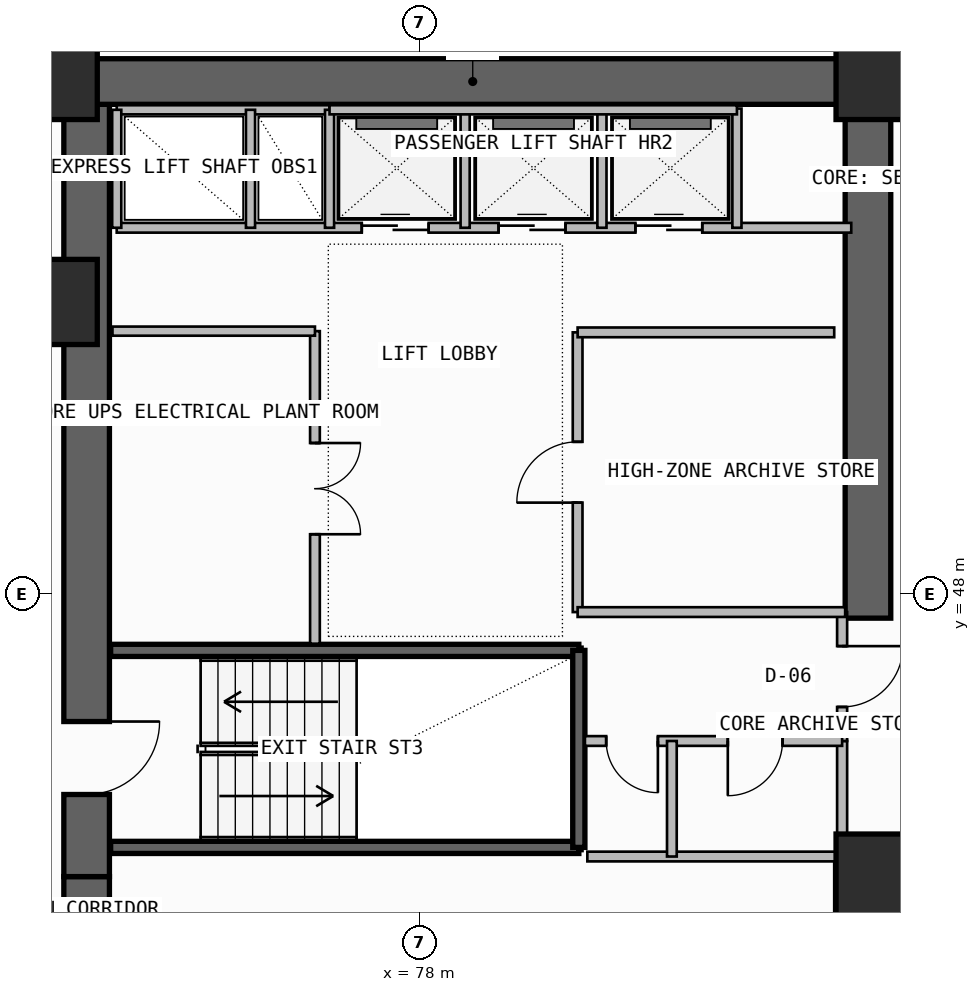
"""IFC4 building model, lengths in metres.
Left out: names, types, materials, properties, quantities, classifications, styles, units other than length and angle.
Written with IfcOpenShell. Run it as: python <this file> out.ifc"""

import sys

from ifc_helpers import new_model, si_unit, direction, frame, frame_2d, origin, origin_2d, place, context, subcontext, project, spatial, rectangle, extrude, element, fill, save


model = new_model("IFC4")
c1 = context("Model", 3, precision=1e-05, world=origin(), true_north=direction((0.0, 1.0)))
c2 = subcontext(c1, "Body", "Model", "MODEL_VIEW")
j1 = project(units=[si_unit("LENGTHUNIT", "METRE"), si_unit("PLANEANGLEUNIT", "RADIAN")], contexts=[c1])
p1 = place(None, origin())
s1 = spatial("IfcSite", under=j1, at=p1, CompositionType="ELEMENT")
p2 = place(p1, origin())
s2 = spatial("IfcBuilding", under=s1, at=p2, CompositionType="ELEMENT")
p3 = place(p2, frame((0.0, 0.0, 225.54)))
s3 = spatial("IfcBuildingStorey", under=s2, at=p3, CompositionType="ELEMENT", Elevation=225.54)
p4 = place(p3, frame((72.525, 35.5, -0.26), z_axis=(0.0, 0.0, 1.0), x_axis=(0.0, 1.0, 0.0)))
e1 = element("IfcWall", 1, at=p4, inside=s3, PredefinedType="SHEAR", context=c2, shape_type="SweptSolid", body=[
    extrude(rectangle(XDim=7.85, YDim=0.75, at=frame_2d((3.925, 0.0))), origin(), (0.0, 0.0, 1.0), 3.52),
])
p5 = place(p4, frame((1.45, 0.0, 0.26)))
e2 = element("IfcOpeningElement", 2, at=p5, cuts=e1, PredefinedType="OPENING", context=c2, shape_type="SweptSolid", body=[
    extrude(rectangle(XDim=1.2, YDim=2.2, at=frame_2d((0.6, 1.1))), frame((0.0, 0.385, 0.0), z_axis=(0.0, -1.0, 0.0), x_axis=(1.0, 0.0, 0.0)), (0.0, 0.0, 1.0), 0.77),
])
p6 = place(p3, frame((72.525, 43.35, -0.26), z_axis=(0.0, 0.0, 1.0), x_axis=(0.0, 1.0, 0.0)))
e3 = element("IfcWall", 3, at=p6, inside=s3, PredefinedType="SHEAR", context=c2, shape_type="SweptSolid", body=[
    extrude(rectangle(XDim=12.7, YDim=0.75, at=frame_2d((6.35, 0.0))), origin(), (0.0, 0.0, 1.0), 3.52),
])
p7 = place(p6, frame((1.35, 0.0, 0.26)))
e4 = element("IfcOpeningElement", 4, at=p7, cuts=e3, PredefinedType="OPENING", context=c2, shape_type="SweptSolid", body=[
    extrude(rectangle(XDim=1.2, YDim=2.2, at=frame_2d((0.6, 1.1))), frame((0.0, 0.385, 0.0), z_axis=(0.0, -1.0, 0.0), x_axis=(1.0, 0.0, 0.0)), (0.0, 0.0, 1.0), 0.77),
])
p8 = place(p3, frame((72.0, 56.425, -0.26), z_axis=(0.0, 0.0, 1.0), x_axis=(1.0, 0.0, 0.0)))
e5 = element("IfcWall", 5, at=p8, inside=s3, PredefinedType="SHEAR", context=c2, shape_type="SweptSolid", body=[
    extrude(rectangle(XDim=13.75, YDim=0.75, at=frame_2d((6.875, 0.0))), origin(), (0.0, 0.0, 1.0), 3.52),
])
p9 = place(p3, frame((85.375, 47.6, -0.26), z_axis=(0.0, 0.0, 1.0), x_axis=(0.0, 1.0, 0.0)))
e6 = element("IfcWall", 6, at=p9, inside=s3, PredefinedType="SHEAR", context=c2, shape_type="SweptSolid", body=[
    extrude(rectangle(XDim=8.45, YDim=0.75, at=frame_2d((4.225, 0.0))), origin(), (0.0, 0.0, 1.0), 3.52),
])
for number, where, z_axis, x_axis in (
    (7, (85.55, 43.35, 0.0), (0.0, 0.0, 1.0), (1.0, 0.0, 0.0)),
    (8, (72.0, 52.8, 0.0), (0.0, 0.0, 1.0), (1.0, 0.0, 0.0)),
    (9, (72.0, 56.5, 0.0), (0.0, 0.0, 1.0), (1.0, 0.0, 0.0)),
    (10, (85.55, 56.5, 0.0), (0.0, 0.0, 1.0), (1.0, 0.0, 0.0)),
):
    element("IfcColumn", number, at=place(p3, frame(where, z_axis=z_axis, x_axis=x_axis)), inside=s3, PredefinedType="COLUMN", context=c2, shape_type="SweptSolid", body=[
        extrude(rectangle(XDim=1.4, YDim=1.4, at=origin_2d()), origin(), (0.0, 0.0, 1.0), 3.52),
    ])
p10 = place(p3, frame((116.396, 56.722, 0.0), z_axis=(0.0, 0.0, 1.0), x_axis=(-0.977936620644, 0.208901809478, 0.0)))
e11 = element("IfcWall", 11, at=p10, inside=s3, PredefinedType="PARAPET", context=c2, shape_type="SweptSolid", body=[
    extrude(rectangle(XDim=31.685, YDim=0.2, at=frame_2d((15.843, 0.0))), origin(), (0.0, 0.0, 1.0), 1.15),
])
p11 = place(p3, frame((84.92, 38.85, 0.0), z_axis=(0.0, 0.0, 1.0), x_axis=(0.0, 1.0, 0.0)))
e12 = element("IfcWall", 12, at=p11, inside=s3, PredefinedType="SOLIDWALL", context=c2, shape_type="SweptSolid", body=[
    extrude(rectangle(XDim=4.83, YDim=0.2, at=frame_2d((2.415, 0.0))), origin(), (0.0, 0.0, 1.0), 3.26),
])
p12 = place(p11, frame((1.25, 0.0, 0.0)))
e13 = element("IfcOpeningElement", 13, at=p12, cuts=e12, PredefinedType="OPENING", context=c2, shape_type="SweptSolid", body=[
    extrude(rectangle(XDim=1.1, YDim=2.2, at=frame_2d((0.55, 1.1))), frame((0.0, 0.11, 0.0), z_axis=(0.0, -1.0, 0.0), x_axis=(1.0, 0.0, 0.0)), (0.0, 0.0, 1.0), 0.22),
])
for number, where, z_axis, x_axis in (
    (14, (72.92, 43.83, -0.26), (0.0, 0.0, 1.0), (1.0, 0.0, 0.0)),
    (15, (72.92, 47.07, -0.26), (0.0, 0.0, 1.0), (1.0, 0.0, 0.0)),
):
    element("IfcWall", number, at=place(p3, frame(where, z_axis=z_axis, x_axis=x_axis)), inside=s3, PredefinedType="SOLIDWALL", context=c2, shape_type="SweptSolid", body=[
        extrude(rectangle(XDim=7.7, YDim=0.2, at=frame_2d((3.85, 0.0))), origin(), (0.0, 0.0, 1.0), 3.52),
    ])
p13 = place(p3, frame((80.62, 43.83, -0.26), z_axis=(0.0, 0.0, 1.0), x_axis=(0.0, 1.0, 0.0)))
e16 = element("IfcWall", 16, at=p13, inside=s3, PredefinedType="SOLIDWALL", context=c2, shape_type="SweptSolid", body=[
    extrude(rectangle(XDim=3.24, YDim=0.2, at=frame_2d((1.62, 0.0))), origin(), (0.0, 0.0, 1.0), 3.52),
])
p14 = place(p3, frame((84.95, 43.68, 0.0), z_axis=(0.0, 0.0, 1.0), x_axis=(0.0, 1.0, 0.0)))
e17 = element("IfcWall", 17, at=p14, inside=s3, PredefinedType="PLUMBINGWALL", context=c2, shape_type="SweptSolid", body=[
    extrude(rectangle(XDim=1.9, YDim=0.165, at=frame_2d((0.95, 0.0))), origin(), (0.0, 0.0, 1.0), 3.26),
])
p15 = place(p3, frame((84.95, 45.58, 0.0), z_axis=(0.0, 0.0, 1.0), x_axis=(0.0, 1.0, 0.0)))
e18 = element("IfcWall", 18, at=p15, inside=s3, PredefinedType="PARTITIONING", context=c2, shape_type="SweptSolid", body=[
    extrude(rectangle(XDim=2.12, YDim=0.165, at=frame_2d((1.06, 0.0))), origin(), (0.0, 0.0, 1.0), 3.26),
])
p16 = place(p15, frame((0.56, 0.0, 0.0)))
e19 = element("IfcOpeningElement", 19, at=p16, cuts=e18, PredefinedType="OPENING", context=c2, shape_type="SweptSolid", body=[
    extrude(rectangle(XDim=1.0, YDim=2.2, at=frame_2d((0.5, 1.1))), frame((0.0, 0.093, 0.0), z_axis=(0.0, -1.0, 0.0), x_axis=(1.0, 0.0, 0.0)), (0.0, 0.0, 1.0), 0.185),
])
p17 = place(p3, frame((80.72, 45.58, 0.0), z_axis=(0.0, 0.0, 1.0), x_axis=(1.0, 0.0, 0.0)))
e20 = element("IfcWall", 20, at=p17, inside=s3, PredefinedType="PLUMBINGWALL", context=c2, shape_type="SweptSolid", body=[
    extrude(rectangle(XDim=4.23, YDim=0.16, at=frame_2d((2.115, 0.0))), origin(), (0.0, 0.0, 1.0), 3.26),
])
p18 = place(p17, frame((0.35, 0.0, 0.0)))
e21 = element("IfcOpeningElement", 21, at=p18, cuts=e20, PredefinedType="OPENING", context=c2, shape_type="SweptSolid", body=[
    extrude(rectangle(XDim=0.85, YDim=2.05, at=frame_2d((0.425, 1.025))), frame((0.0, 0.09, 0.0), z_axis=(0.0, -1.0, 0.0), x_axis=(1.0, 0.0, 0.0)), (0.0, 0.0, 1.0), 0.18),
])
p19 = place(p17, frame((2.35, 0.0, 0.0)))
e22 = element("IfcOpeningElement", 22, at=p19, cuts=e20, PredefinedType="OPENING", context=c2, shape_type="SweptSolid", body=[
    extrude(rectangle(XDim=0.9, YDim=2.1, at=frame_2d((0.45, 1.05))), frame((0.0, 0.09, 0.0), z_axis=(0.0, -1.0, 0.0), x_axis=(1.0, 0.0, 0.0)), (0.0, 0.0, 1.0), 0.18),
])
p20 = place(p3, frame((80.76, 43.68, 0.0), z_axis=(0.0, 0.0, 1.0), x_axis=(1.0, 0.0, 0.0)))
e23 = element("IfcWall", 23, at=p20, inside=s3, PredefinedType="PLUMBINGWALL", context=c2, shape_type="SweptSolid", body=[
    extrude(rectangle(XDim=4.19, YDim=0.16, at=frame_2d((2.095, 0.0))), origin(), (0.0, 0.0, 1.0), 3.26),
])
p21 = place(p3, frame((82.15, 43.68, 0.0), z_axis=(0.0, 0.0, 1.0), x_axis=(0.0, 1.0, 0.0)))
e24 = element("IfcWall", 24, at=p21, inside=s3, PredefinedType="PLUMBINGWALL", context=c2, shape_type="SweptSolid", body=[
    extrude(rectangle(XDim=1.9, YDim=0.16, at=frame_2d((0.95, 0.0))), origin(), (0.0, 0.0, 1.0), 3.26),
])
p22 = place(p3, frame((76.28, 47.18, 0.0), z_axis=(0.0, 0.0, 1.0), x_axis=(0.0, 1.0, 0.0)))
e25 = element("IfcWall", 25, at=p22, inside=s3, PredefinedType="SOLIDWALL", context=c2, shape_type="SweptSolid", body=[
    extrude(rectangle(XDim=5.14, YDim=0.16, at=frame_2d((2.57, 0.0))), origin(), (0.0, 0.0, 1.0), 3.26),
])
p23 = place(p22, frame((1.8, 0.0, 0.0)))
e26 = element("IfcOpeningElement", 26, at=p23, cuts=e25, PredefinedType="OPENING", context=c2, shape_type="SweptSolid", body=[
    extrude(rectangle(XDim=1.5, YDim=2.25, at=frame_2d((0.75, 1.125))), frame((0.0, 0.09, 0.0), z_axis=(0.0, -1.0, 0.0), x_axis=(1.0, 0.0, 0.0)), (0.0, 0.0, 1.0), 0.18),
])
p24 = place(p3, frame((72.95, 52.32, 0.0), z_axis=(0.0, 0.0, 1.0), x_axis=(1.0, 0.0, 0.0)))
e27 = element("IfcWall", 27, at=p24, inside=s3, PredefinedType="SOLIDWALL", context=c2, shape_type="SweptSolid", body=[
    extrude(rectangle(XDim=3.33, YDim=0.15, at=frame_2d((1.665, 0.0))), origin(), (0.0, 0.0, 1.0), 3.26),
])
p25 = place(p3, frame((80.6, 47.7, 0.0), z_axis=(0.0, 0.0, 1.0), x_axis=(0.0, 1.0, 0.0)))
e28 = element("IfcWall", 28, at=p25, inside=s3, PredefinedType="SOLIDWALL", context=c2, shape_type="SweptSolid", body=[
    extrude(rectangle(XDim=4.6, YDim=0.16, at=frame_2d((2.3, 0.0))), origin(), (0.0, 0.0, 1.0), 3.26),
])
p26 = place(p25, frame((1.8, 0.0, 0.0)))
e29 = element("IfcOpeningElement", 29, at=p26, cuts=e28, PredefinedType="OPENING", context=c2, shape_type="SweptSolid", body=[
    extrude(rectangle(XDim=1.0, YDim=2.2, at=frame_2d((0.5, 1.1))), frame((0.0, 0.09, 0.0), z_axis=(0.0, -1.0, 0.0), x_axis=(1.0, 0.0, 0.0)), (0.0, 0.0, 1.0), 0.18),
])
p27 = place(p3, frame((80.6, 47.7, 0.0), z_axis=(0.0, 0.0, 1.0), x_axis=(1.0, 0.0, 0.0)))
e30 = element("IfcWall", 30, at=p27, inside=s3, PredefinedType="SOLIDWALL", context=c2, shape_type="SweptSolid", body=[
    extrude(rectangle(XDim=4.4, YDim=0.16, at=frame_2d((2.2, 0.0))), origin(), (0.0, 0.0, 1.0), 3.26),
])
p28 = place(p3, frame((80.6, 52.3, 0.0), z_axis=(0.0, 0.0, 1.0), x_axis=(1.0, 0.0, 0.0)))
e31 = element("IfcWall", 31, at=p28, inside=s3, PredefinedType="SOLIDWALL", context=c2, shape_type="SweptSolid", body=[
    extrude(rectangle(XDim=4.22, YDim=0.16, at=frame_2d((2.11, 0.0))), origin(), (0.0, 0.0, 1.0), 3.26),
])
p29 = place(p3, frame((73.02, 54.02, 0.0), z_axis=(0.0, 0.0, 1.0), x_axis=(1.0, 0.0, 0.0)))
e32 = element("IfcWall", 32, at=p29, inside=s3, PredefinedType="SOLIDWALL", context=c2, shape_type="SweptSolid", body=[
    extrude(rectangle(XDim=12.08, YDim=0.16, at=frame_2d((6.04, 0.0))), origin(), (0.0, 0.0, 1.0), 3.26),
])
p30 = place(p29, frame((4.03, 0.0, 0.0)))
e33 = element("IfcOpeningElement", 33, at=p30, cuts=e32, PredefinedType="OPENING", context=c2, shape_type="SweptSolid", body=[
    extrude(rectangle(XDim=1.1, YDim=2.25, at=frame_2d((0.55, 1.125))), frame((0.0, 0.09, 0.0), z_axis=(0.0, -1.0, 0.0), x_axis=(1.0, 0.0, 0.0)), (0.0, 0.0, 1.0), 0.18),
])
p31 = place(p29, frame((6.28, 0.0, 0.0)))
e34 = element("IfcOpeningElement", 34, at=p31, cuts=e32, PredefinedType="OPENING", context=c2, shape_type="SweptSolid", body=[
    extrude(rectangle(XDim=1.1, YDim=2.25, at=frame_2d((0.55, 1.125))), frame((0.0, 0.09, 0.0), z_axis=(0.0, -1.0, 0.0), x_axis=(1.0, 0.0, 0.0)), (0.0, 0.0, 1.0), 0.18),
])
p32 = place(p29, frame((8.53, 0.0, 0.0)))
e35 = element("IfcOpeningElement", 35, at=p32, cuts=e32, PredefinedType="OPENING", context=c2, shape_type="SweptSolid", body=[
    extrude(rectangle(XDim=1.1, YDim=2.25, at=frame_2d((0.55, 1.125))), frame((0.0, 0.09, 0.0), z_axis=(0.0, -1.0, 0.0), x_axis=(1.0, 0.0, 0.0)), (0.0, 0.0, 1.0), 0.18),
])
p33 = place(p3, frame((73.02, 55.96, 0.0), z_axis=(0.0, 0.0, 1.0), x_axis=(1.0, 0.0, 0.0)))
e36 = element("IfcWall", 36, at=p33, inside=s3, PredefinedType="SOLIDWALL", context=c2, shape_type="SweptSolid", body=[
    extrude(rectangle(XDim=3.5, YDim=0.15, at=frame_2d((1.75, 0.0))), origin(), (0.0, 0.0, 1.0), 3.26),
])
p34 = place(p3, frame((73.02, 54.02, 0.0), z_axis=(0.0, 0.0, 1.0), x_axis=(0.0, 1.0, 0.0)))
e37 = element("IfcWall", 37, at=p34, inside=s3, PredefinedType="PLUMBINGWALL", context=c2, shape_type="SweptSolid", body=[
    extrude(rectangle(XDim=1.94, YDim=0.15, at=frame_2d((0.97, 0.0))), origin(), (0.0, 0.0, 1.0), 3.26),
])
p35 = place(p3, frame((76.52, 54.02, 0.0), z_axis=(0.0, 0.0, 1.0), x_axis=(0.0, 1.0, 0.0)))
e38 = element("IfcWall", 38, at=p35, inside=s3, PredefinedType="SOLIDWALL", context=c2, shape_type="SweptSolid", body=[
    extrude(rectangle(XDim=1.94, YDim=0.15, at=frame_2d((0.97, 0.0))), origin(), (0.0, 0.0, 1.0), 3.26),
])
p36 = place(p3, frame((75.22, 54.02, 0.0), z_axis=(0.0, 0.0, 1.0), x_axis=(0.0, 1.0, 0.0)))
e39 = element("IfcWall", 39, at=p36, inside=s3, PredefinedType="PLUMBINGWALL", context=c2, shape_type="SweptSolid", body=[
    extrude(rectangle(XDim=1.94, YDim=0.15, at=frame_2d((0.97, 0.0))), origin(), (0.0, 0.0, 1.0), 3.26),
])
for number, where, z_axis, x_axis in (
    (40, (78.75, 54.02, 0.0), (0.0, 0.0, 1.0), (0.0, 1.0, 0.0)),
    (41, (81.0, 54.02, 0.0), (0.0, 0.0, 1.0), (0.0, 1.0, 0.0)),
):
    element("IfcWall", number, at=place(p3, frame(where, z_axis=z_axis, x_axis=x_axis)), inside=s3, PredefinedType="PLUMBINGWALL", context=c2, shape_type="SweptSolid", body=[
        extrude(rectangle(XDim=1.96, YDim=0.15, at=frame_2d((0.98, 0.0))), origin(), (0.0, 0.0, 1.0), 3.26),
    ])
p37 = place(p3, frame((83.22, 54.02, 0.0), z_axis=(0.0, 0.0, 1.0), x_axis=(0.0, 1.0, 0.0)))
e42 = element("IfcWall", 42, at=p37, inside=s3, PredefinedType="SOLIDWALL", context=c2, shape_type="SweptSolid", body=[
    extrude(rectangle(XDim=1.96, YDim=0.15, at=frame_2d((0.98, 0.0))), origin(), (0.0, 0.0, 1.0), 3.26),
])
p38 = place(p3, frame((76.52, 55.96, 0.0), z_axis=(0.0, 0.0, 1.0), x_axis=(1.0, 0.0, 0.0)))
e43 = element("IfcWall", 43, at=p38, inside=s3, PredefinedType="SOLIDWALL", context=c2, shape_type="SweptSolid", body=[
    extrude(rectangle(XDim=6.7, YDim=0.15, at=frame_2d((3.35, 0.0))), origin(), (0.0, 0.0, 1.0), 3.26),
])
p39 = place(p7, frame((1.2, 0.0, 0.0), z_axis=(0.0, 0.0, 1.0), x_axis=(-1.0, 0.0, 0.0)))
e44 = element("IfcDoor", 44, at=p39, inside=s3, OperationType="SINGLE_SWING_LEFT", PredefinedType="USERDEFINED", context=c2, shape_type="SweptSolid", body=[
    extrude(rectangle(XDim=1.2, YDim=2.2, at=frame_2d((0.6, 1.1))), frame((0.0, 0.025, 0.0), z_axis=(0.0, -1.0, 0.0), x_axis=(1.0, 0.0, 0.0)), (0.0, 0.0, 1.0), 0.05),
])
fill(e4, e44)
p40 = place(p16, frame((1.0, 0.0, 0.0), z_axis=(0.0, 0.0, 1.0), x_axis=(-1.0, 0.0, 0.0)))
e45 = element("IfcDoor", 45, at=p40, inside=s3, OperationType="SINGLE_SWING_LEFT", PredefinedType="DOOR", context=c2, shape_type="SweptSolid", body=[
    extrude(rectangle(XDim=1.0, YDim=2.2, at=frame_2d((0.5, 1.1))), frame((0.0, 0.025, 0.0), z_axis=(0.0, -1.0, 0.0), x_axis=(1.0, 0.0, 0.0)), (0.0, 0.0, 1.0), 0.05),
])
fill(e19, e45)
p41 = place(p18, frame((0.85, 0.0, 0.0), z_axis=(0.0, 0.0, 1.0), x_axis=(-1.0, 0.0, 0.0)))
e46 = element("IfcDoor", 46, at=p41, inside=s3, OperationType="SINGLE_SWING_LEFT", PredefinedType="DOOR", context=c2, shape_type="SweptSolid", body=[
    extrude(rectangle(XDim=0.85, YDim=2.05, at=frame_2d((0.425, 1.025))), frame((0.0, 0.025, 0.0), z_axis=(0.0, -1.0, 0.0), x_axis=(1.0, 0.0, 0.0)), (0.0, 0.0, 1.0), 0.05),
])
fill(e21, e46)
p42 = place(p19, frame((0.9, 0.0, 0.0), z_axis=(0.0, 0.0, 1.0), x_axis=(-1.0, 0.0, 0.0)))
e47 = element("IfcDoor", 47, at=p42, inside=s3, OperationType="SINGLE_SWING_RIGHT", PredefinedType="DOOR", context=c2, shape_type="SweptSolid", body=[
    extrude(rectangle(XDim=0.9, YDim=2.1, at=frame_2d((0.45, 1.05))), frame((0.0, 0.025, 0.0), z_axis=(0.0, -1.0, 0.0), x_axis=(1.0, 0.0, 0.0)), (0.0, 0.0, 1.0), 0.05),
])
fill(e22, e47)
p43 = place(p23, frame((1.5, 0.0, 0.0), z_axis=(0.0, 0.0, 1.0), x_axis=(-1.0, 0.0, 0.0)))
e48 = element("IfcDoor", 48, at=p43, inside=s3, OperationType="DOUBLE_DOOR_SINGLE_SWING", PredefinedType="DOOR", context=c2, shape_type="SweptSolid", body=[
    extrude(rectangle(XDim=1.5, YDim=2.25, at=frame_2d((0.75, 1.125))), frame((0.0, 0.025, 0.0), z_axis=(0.0, -1.0, 0.0), x_axis=(1.0, 0.0, 0.0)), (0.0, 0.0, 1.0), 0.05),
])
fill(e26, e48)
p44 = place(p26, origin())
e49 = element("IfcDoor", 49, at=p44, inside=s3, OperationType="SINGLE_SWING_LEFT", PredefinedType="DOOR", context=c2, shape_type="SweptSolid", body=[
    extrude(rectangle(XDim=1.0, YDim=2.2, at=frame_2d((0.5, 1.1))), frame((0.0, 0.025, 0.0), z_axis=(0.0, -1.0, 0.0), x_axis=(1.0, 0.0, 0.0)), (0.0, 0.0, 1.0), 0.05),
])
fill(e29, e49)
p45 = place(p30, origin())
e50 = element("IfcDoor", 50, at=p45, inside=s3, OperationType="DOUBLE_DOOR_SLIDING", PredefinedType="DOOR", context=c2, shape_type="SweptSolid", body=[
    extrude(rectangle(XDim=1.1, YDim=2.25, at=frame_2d((0.55, 1.125))), frame((0.0, 0.025, 0.0), z_axis=(0.0, -1.0, 0.0), x_axis=(1.0, 0.0, 0.0)), (0.0, 0.0, 1.0), 0.05),
])
fill(e33, e50)
p46 = place(p31, origin())
e51 = element("IfcDoor", 51, at=p46, inside=s3, OperationType="DOUBLE_DOOR_SLIDING", PredefinedType="DOOR", context=c2, shape_type="SweptSolid", body=[
    extrude(rectangle(XDim=1.1, YDim=2.25, at=frame_2d((0.55, 1.125))), frame((0.0, 0.025, 0.0), z_axis=(0.0, -1.0, 0.0), x_axis=(1.0, 0.0, 0.0)), (0.0, 0.0, 1.0), 0.05),
])
fill(e34, e51)
p47 = place(p32, origin())
e52 = element("IfcDoor", 52, at=p47, inside=s3, OperationType="DOUBLE_DOOR_SLIDING", PredefinedType="DOOR", context=c2, shape_type="SweptSolid", body=[
    extrude(rectangle(XDim=1.1, YDim=2.25, at=frame_2d((0.55, 1.125))), frame((0.0, 0.025, 0.0), z_axis=(0.0, -1.0, 0.0), x_axis=(1.0, 0.0, 0.0)), (0.0, 0.0, 1.0), 0.05),
])
fill(e35, e52)
save(model, sys.argv[1])
